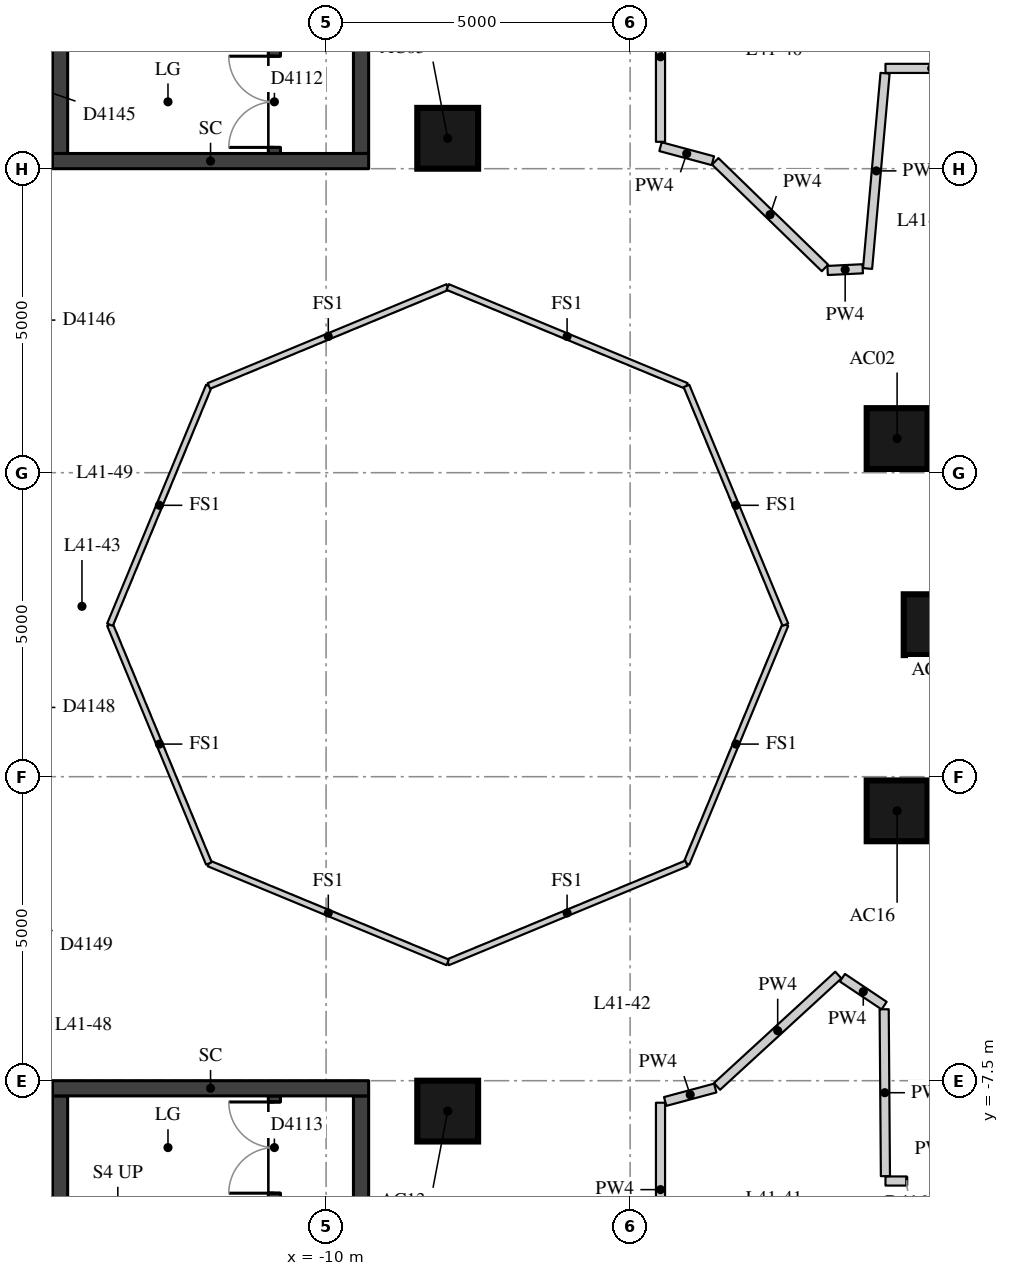
"""IFC4 building model, lengths in metres.
Left out: names, types, materials, properties, quantities, classifications, styles, units other than length and angle.
Written with IfcOpenShell. Run it as: python <this file> out.ifc"""

import sys

from ifc_helpers import new_model, si_unit, direction, frame, frame_2d, origin, origin_2d, place, context, subcontext, project, spatial, rectangle, extrude, element, fill, save


model = new_model("IFC4")
c1 = context("Model", 3, precision=1e-05, world=origin(), true_north=direction((0.0, 1.0)))
c2 = subcontext(c1, "Body", "Model", "MODEL_VIEW")
j1 = project(units=[si_unit("LENGTHUNIT", "METRE"), si_unit("PLANEANGLEUNIT", "RADIAN")], contexts=[c1])
p1 = place(None, origin())
s1 = spatial("IfcSite", under=j1, at=p1, CompositionType="ELEMENT")
p2 = place(p1, origin())
s2 = spatial("IfcBuilding", under=s1, at=p2, CompositionType="ELEMENT")
p3 = place(p2, frame((0.0, 0.0, 148.4)))
s3 = spatial("IfcBuildingStorey", under=s2, at=p3, CompositionType="ELEMENT", Elevation=148.4)
for number, where, z_axis, x_axis in (
    (1, (0.0, 0.0, 0.0), (0.0, 0.0, 1.0), (1.0, 0.0, 0.0)),
    (2, (-0.609, 3.062, 0.0), (0.0, 0.0, 1.0), (1.0, 0.0, 0.0)),
    (3, (-8.0, 8.0, 0.0), (0.0, 0.0, 1.0), (1.0, 0.0, 0.0)),
    (4, (-8.0, -8.0, 0.0), (0.0, 0.0, 1.0), (1.0, 0.0, 0.0)),
    (5, (-0.609, -3.062, 0.0), (0.0, 0.0, 1.0), (1.0, 0.0, 0.0)),
):
    element("IfcColumn", number, at=place(p3, frame(where, z_axis=z_axis, x_axis=x_axis)), inside=s3, PredefinedType="COLUMN", context=c2, shape_type="SweptSolid", body=[
        extrude(rectangle(XDim=1.0, YDim=1.0, at=origin_2d()), origin(), (0.0, 0.0, 1.0), 3.3),
    ])
p4 = place(p3, frame((-10.85, 7.75, 0.0), z_axis=(0.0, 0.0, 1.0), x_axis=(0.0, 1.0, 0.0)))
e6 = element("IfcWall", 6, at=p4, inside=s3, PredefinedType="SHEAR", context=c2, shape_type="SweptSolid", body=[
    extrude(rectangle(XDim=6.0, YDim=0.2, at=frame_2d((3.0, 0.0))), origin(), (0.0, 0.0, 1.0), 3.02),
])
p5 = place(p4, frame((0.1, 0.0, 0.0)))
e7 = element("IfcOpeningElement", 7, at=p5, cuts=e6, PredefinedType="OPENING", context=c2, shape_type="SweptSolid", body=[
    extrude(rectangle(XDim=1.5, YDim=2.1, at=frame_2d((0.75, 1.05))), frame((0.0, 0.11, 0.0), z_axis=(0.0, -1.0, 0.0), x_axis=(1.0, 0.0, 0.0)), (0.0, 0.0, 1.0), 0.22),
])
p6 = place(p3, frame((-10.85, -13.75, 0.0), z_axis=(0.0, 0.0, 1.0), x_axis=(0.0, 1.0, 0.0)))
e8 = element("IfcWall", 8, at=p6, inside=s3, PredefinedType="SHEAR", context=c2, shape_type="SweptSolid", body=[
    extrude(rectangle(XDim=6.0, YDim=0.2, at=frame_2d((3.0, 0.0))), origin(), (0.0, 0.0, 1.0), 3.02),
])
p7 = place(p6, frame((4.4, 0.0, 0.0)))
e9 = element("IfcOpeningElement", 9, at=p7, cuts=e8, PredefinedType="OPENING", context=c2, shape_type="SweptSolid", body=[
    extrude(rectangle(XDim=1.5, YDim=2.1, at=frame_2d((0.75, 1.05))), frame((0.0, 0.11, 0.0), z_axis=(0.0, -1.0, 0.0), x_axis=(1.0, 0.0, 0.0)), (0.0, 0.0, 1.0), 0.22),
])
p8 = place(p3, frame((-14.375, 7.75, -0.28), z_axis=(0.0, 0.0, 1.0), x_axis=(0.0, 1.0, 0.0)))
e10 = element("IfcWall", 10, at=p8, inside=s3, PredefinedType="SHEAR", context=c2, shape_type="SweptSolid", body=[
    extrude(rectangle(XDim=6.0, YDim=0.25, at=frame_2d((3.0, 0.0))), origin(), (0.0, 0.0, 1.0), 3.3),
])
p9 = place(p3, frame((-9.425, 7.75, -0.28), z_axis=(0.0, 0.0, 1.0), x_axis=(0.0, 1.0, 0.0)))
e11 = element("IfcWall", 11, at=p9, inside=s3, PredefinedType="SHEAR", context=c2, shape_type="SweptSolid", body=[
    extrude(rectangle(XDim=6.0, YDim=0.25, at=frame_2d((3.0, 0.0))), origin(), (0.0, 0.0, 1.0), 3.3),
])
p10 = place(p9, frame((2.1, 0.0, 0.28)))
e12 = element("IfcOpeningElement", 12, at=p10, cuts=e11, PredefinedType="OPENING", context=c2, shape_type="SweptSolid", body=[
    extrude(rectangle(XDim=1.5, YDim=2.1, at=frame_2d((0.75, 1.05))), frame((0.0, 0.135, 0.0), z_axis=(0.0, -1.0, 0.0), x_axis=(1.0, 0.0, 0.0)), (0.0, 0.0, 1.0), 0.27),
])
p11 = place(p3, frame((-14.5, 7.625, -0.28), z_axis=(0.0, 0.0, 1.0), x_axis=(1.0, 0.0, 0.0)))
e13 = element("IfcWall", 13, at=p11, inside=s3, PredefinedType="SHEAR", context=c2, shape_type="SweptSolid", body=[
    extrude(rectangle(XDim=5.2, YDim=0.25, at=frame_2d((2.6, 0.0))), origin(), (0.0, 0.0, 1.0), 3.3),
])
p12 = place(p3, frame((-14.375, -13.75, -0.28), z_axis=(0.0, 0.0, 1.0), x_axis=(0.0, 1.0, 0.0)))
e14 = element("IfcWall", 14, at=p12, inside=s3, PredefinedType="SHEAR", context=c2, shape_type="SweptSolid", body=[
    extrude(rectangle(XDim=6.0, YDim=0.25, at=frame_2d((3.0, 0.0))), origin(), (0.0, 0.0, 1.0), 3.3),
])
p13 = place(p3, frame((-9.425, -13.75, -0.28), z_axis=(0.0, 0.0, 1.0), x_axis=(0.0, 1.0, 0.0)))
e15 = element("IfcWall", 15, at=p13, inside=s3, PredefinedType="SHEAR", context=c2, shape_type="SweptSolid", body=[
    extrude(rectangle(XDim=6.0, YDim=0.25, at=frame_2d((3.0, 0.0))), origin(), (0.0, 0.0, 1.0), 3.3),
])
p14 = place(p13, frame((2.4, 0.0, 0.28)))
e16 = element("IfcOpeningElement", 16, at=p14, cuts=e15, PredefinedType="OPENING", context=c2, shape_type="SweptSolid", body=[
    extrude(rectangle(XDim=1.5, YDim=2.1, at=frame_2d((0.75, 1.05))), frame((0.0, 0.135, 0.0), z_axis=(0.0, -1.0, 0.0), x_axis=(1.0, 0.0, 0.0)), (0.0, 0.0, 1.0), 0.27),
])
p15 = place(p3, frame((-14.5, -7.625, -0.28), z_axis=(0.0, 0.0, 1.0), x_axis=(1.0, 0.0, 0.0)))
e17 = element("IfcWall", 17, at=p15, inside=s3, PredefinedType="SHEAR", context=c2, shape_type="SweptSolid", body=[
    extrude(rectangle(XDim=5.2, YDim=0.25, at=frame_2d((2.6, 0.0))), origin(), (0.0, 0.0, 1.0), 3.3),
])
p16 = place(p3, frame((-14.59, -7.807, 0.0), z_axis=(0.0, 0.0, 1.0), x_axis=(-0.280401457903, 0.959882817018, 0.0)))
e18 = element("IfcWall", 18, at=p16, inside=s3, PredefinedType="PARTITIONING", context=c2, shape_type="SweptSolid", body=[
    extrude(rectangle(XDim=2.195, YDim=0.2, at=frame_2d((1.098, 0.0))), origin(), (0.0, 0.0, 1.0), 3.02),
])
p17 = place(p3, frame((-16.228, 7.992, 0.0), z_axis=(0.0, 0.0, 1.0), x_axis=(0.513936465122, 0.857828251935, 0.0)))
e19 = element("IfcWall", 19, at=p17, inside=s3, PredefinedType="PARTITIONING", context=c2, shape_type="SweptSolid", body=[
    extrude(rectangle(XDim=3.21, YDim=0.2, at=frame_2d((1.605, 0.0))), origin(), (0.0, 0.0, 1.0), 3.02),
])
p18 = place(p17, frame((0.848, 0.0, 0.0)))
e20 = element("IfcOpeningElement", 20, at=p18, cuts=e19, PredefinedType="OPENING", context=c2, shape_type="SweptSolid", body=[
    extrude(rectangle(XDim=0.9, YDim=2.1, at=frame_2d((0.45, 1.05))), frame((0.0, 0.11, 0.0), z_axis=(0.0, -1.0, 0.0), x_axis=(1.0, 0.0, 0.0)), (0.0, 0.0, 1.0), 0.22),
])
p19 = place(p3, frame((0.72, 9.15, 0.0), z_axis=(0.0, 0.0, 1.0), x_axis=(-1.0, 0.0, 0.0)))
e21 = element("IfcWall", 21, at=p19, inside=s3, PredefinedType="PARTITIONING", context=c2, shape_type="SweptSolid", body=[
    extrude(rectangle(XDim=1.52, YDim=0.15, at=frame_2d((0.76, 0.0))), origin(), (0.0, 0.0, 1.0), 3.02),
])
p20 = place(p3, frame((-0.807, 9.07, 0.0), z_axis=(0.0, 0.0, 1.0), x_axis=(-0.089184087733, -0.996015159772, 0.0)))
e22 = element("IfcWall", 22, at=p20, inside=s3, PredefinedType="PARTITIONING", context=c2, shape_type="SweptSolid", body=[
    extrude(rectangle(XDim=3.225, YDim=0.15, at=frame_2d((1.612, 0.0))), origin(), (0.0, 0.0, 1.0), 3.02),
])
p21 = place(p3, frame((-1.175, 5.854, 0.0), z_axis=(0.0, 0.0, 1.0), x_axis=(-0.998798267986, -0.049010405705, 0.0)))
e23 = element("IfcWall", 23, at=p21, inside=s3, PredefinedType="PARTITIONING", context=c2, shape_type="SweptSolid", body=[
    extrude(rectangle(XDim=0.578, YDim=0.15, at=frame_2d((0.289, 0.0))), origin(), (0.0, 0.0, 1.0), 3.02),
])
p22 = place(p3, frame((-1.795, 5.867, 0.0), z_axis=(0.0, 0.0, 1.0), x_axis=(-0.717315398231, 0.696748605639, 0.0)))
e24 = element("IfcWall", 24, at=p22, inside=s3, PredefinedType="PARTITIONING", context=c2, shape_type="SweptSolid", body=[
    extrude(rectangle(XDim=2.517, YDim=0.15, at=frame_2d((1.258, 0.0))), origin(), (0.0, 0.0, 1.0), 3.02),
])
p23 = place(p3, frame((-3.639, 7.631, 0.0), z_axis=(0.0, 0.0, 1.0), x_axis=(-0.965879594242, 0.258991523853, 0.0)))
e25 = element("IfcWall", 25, at=p23, inside=s3, PredefinedType="PARTITIONING", context=c2, shape_type="SweptSolid", body=[
    extrude(rectangle(XDim=0.892, YDim=0.15, at=frame_2d((0.446, 0.0))), origin(), (0.0, 0.0, 1.0), 3.02),
])
p24 = place(p3, frame((-4.5, 7.942, 0.0), z_axis=(0.0, 0.0, 1.0), x_axis=(0.0, 1.0, 0.0)))
e26 = element("IfcWall", 26, at=p24, inside=s3, PredefinedType="PARTITIONING", context=c2, shape_type="SweptSolid", body=[
    extrude(rectangle(XDim=2.796, YDim=0.15, at=frame_2d((1.398, 0.0))), origin(), (0.0, 0.0, 1.0), 3.02),
])
p25 = place(p3, frame((-0.8, -9.15, 0.0), z_axis=(0.0, 0.0, 1.0), x_axis=(1.0, 0.0, 0.0)))
e27 = element("IfcWall", 27, at=p25, inside=s3, PredefinedType="PARTITIONING", context=c2, shape_type="SweptSolid", body=[
    extrude(rectangle(XDim=1.6, YDim=0.15, at=frame_2d((0.8, 0.0))), origin(), (0.0, 0.0, 1.0), 3.02),
])
p26 = place(p25, frame((0.35, 0.0, 0.0)))
e28 = element("IfcOpeningElement", 28, at=p26, cuts=e27, PredefinedType="OPENING", context=c2, shape_type="SweptSolid", body=[
    extrude(rectangle(XDim=0.9, YDim=2.1, at=frame_2d((0.45, 1.05))), frame((0.0, 0.085, 0.0), z_axis=(0.0, -1.0, 0.0), x_axis=(1.0, 0.0, 0.0)), (0.0, 0.0, 1.0), 0.17),
])
p27 = place(p3, frame((-4.5, -10.721, 0.0), z_axis=(0.0, 0.0, 1.0), x_axis=(0.0, 1.0, 0.0)))
e29 = element("IfcWall", 29, at=p27, inside=s3, PredefinedType="PARTITIONING", context=c2, shape_type="SweptSolid", body=[
    extrude(rectangle(XDim=2.859, YDim=0.15, at=frame_2d((1.43, 0.0))), origin(), (0.0, 0.0, 1.0), 3.02),
])
p28 = place(p3, frame((-4.423, -7.842, 0.0), z_axis=(0.0, 0.0, 1.0), x_axis=(0.965853333569, 0.259089440221, 0.0)))
e30 = element("IfcWall", 30, at=p28, inside=s3, PredefinedType="PARTITIONING", context=c2, shape_type="SweptSolid", body=[
    extrude(rectangle(XDim=0.852, YDim=0.15, at=frame_2d((0.426, 0.0))), origin(), (0.0, 0.0, 1.0), 3.02),
])
p29 = place(p3, frame((-3.571, -7.594, 0.0), z_axis=(0.0, 0.0, 1.0), x_axis=(0.736783660812, 0.676128565555, 0.0)))
e31 = element("IfcWall", 31, at=p29, inside=s3, PredefinedType="PARTITIONING", context=c2, shape_type="SweptSolid", body=[
    extrude(rectangle(XDim=2.709, YDim=0.15, at=frame_2d((1.354, 0.0))), origin(), (0.0, 0.0, 1.0), 3.02),
])
p30 = place(p3, frame((-1.509, -5.806, 0.0), z_axis=(0.0, 0.0, 1.0), x_axis=(0.831367153095, -0.55572354346, 0.0)))
e32 = element("IfcWall", 32, at=p30, inside=s3, PredefinedType="PARTITIONING", context=c2, shape_type="SweptSolid", body=[
    extrude(rectangle(XDim=0.825, YDim=0.15, at=frame_2d((0.413, 0.0))), origin(), (0.0, 0.0, 1.0), 3.02),
])
p31 = place(p3, frame((-0.822, -6.325, 0.0), z_axis=(0.0, 0.0, 1.0), x_axis=(0.007471771501, -0.999972085926, 0.0)))
e33 = element("IfcWall", 33, at=p31, inside=s3, PredefinedType="PARTITIONING", context=c2, shape_type="SweptSolid", body=[
    extrude(rectangle(XDim=2.745, YDim=0.15, at=frame_2d((1.372, 0.0))), origin(), (0.0, 0.0, 1.0), 3.02),
])
for number, where, z_axis, x_axis in (
    (34, (-2.446, 0.0, 0.0), (0.0, 0.0, 1.0), (-0.383, -0.924, 0.0)),
    (35, (-4.073, -3.927, 0.0), (0.0, 0.0, 1.0), (-0.924, -0.383, 0.0)),
    (36, (-8.0, -5.554, 0.0), (0.0, 0.0, 1.0), (-0.924, 0.383, 0.0)),
    (37, (-11.927, -3.927, 0.0), (0.0, 0.0, 1.0), (-0.383, 0.924, 0.0)),
    (38, (-13.554, 0.0, 0.0), (0.0, 0.0, 1.0), (0.383, 0.924, 0.0)),
    (39, (-11.927, 3.927, 0.0), (0.0, 0.0, 1.0), (0.924, 0.383, 0.0)),
    (40, (-8.0, 5.554, 0.0), (0.0, 0.0, 1.0), (0.924, -0.383, 0.0)),
    (41, (-4.073, 3.927, 0.0), (0.0, 0.0, 1.0), (0.383, -0.924, 0.0)),
):
    element("IfcWall", number, at=place(p3, frame(where, z_axis=z_axis, x_axis=x_axis)), inside=s3, PredefinedType="PARTITIONING", context=c2, shape_type="SweptSolid", body=[
        extrude(rectangle(XDim=4.251, YDim=0.1, at=frame_2d((2.125, 0.0))), origin(), (0.0, 0.0, 1.0), 3.02),
    ])
p32 = place(p5, origin())
e42 = element("IfcDoor", 42, at=p32, inside=s3, OperationType="DOUBLE_DOOR_SINGLE_SWING", PredefinedType="DOOR", context=c2, shape_type="SweptSolid", body=[
    extrude(rectangle(XDim=1.5, YDim=2.1, at=frame_2d((0.75, 1.05))), frame((0.0, 0.025, 0.0), z_axis=(0.0, -1.0, 0.0), x_axis=(1.0, 0.0, 0.0)), (0.0, 0.0, 1.0), 0.05),
])
fill(e7, e42)
p33 = place(p7, origin())
e43 = element("IfcDoor", 43, at=p33, inside=s3, OperationType="DOUBLE_DOOR_SINGLE_SWING", PredefinedType="DOOR", context=c2, shape_type="SweptSolid", body=[
    extrude(rectangle(XDim=1.5, YDim=2.1, at=frame_2d((0.75, 1.05))), frame((0.0, 0.025, 0.0), z_axis=(0.0, -1.0, 0.0), x_axis=(1.0, 0.0, 0.0)), (0.0, 0.0, 1.0), 0.05),
])
fill(e9, e43)
p34 = place(p26, origin())
e44 = element("IfcDoor", 44, at=p34, inside=s3, OperationType="SINGLE_SWING_LEFT", PredefinedType="DOOR", context=c2, shape_type="SweptSolid", body=[
    extrude(rectangle(XDim=0.9, YDim=2.1, at=frame_2d((0.45, 1.05))), frame((0.0, 0.025, 0.0), z_axis=(0.0, -1.0, 0.0), x_axis=(1.0, 0.0, 0.0)), (0.0, 0.0, 1.0), 0.05),
])
fill(e28, e44)
save(model, sys.argv[1])
